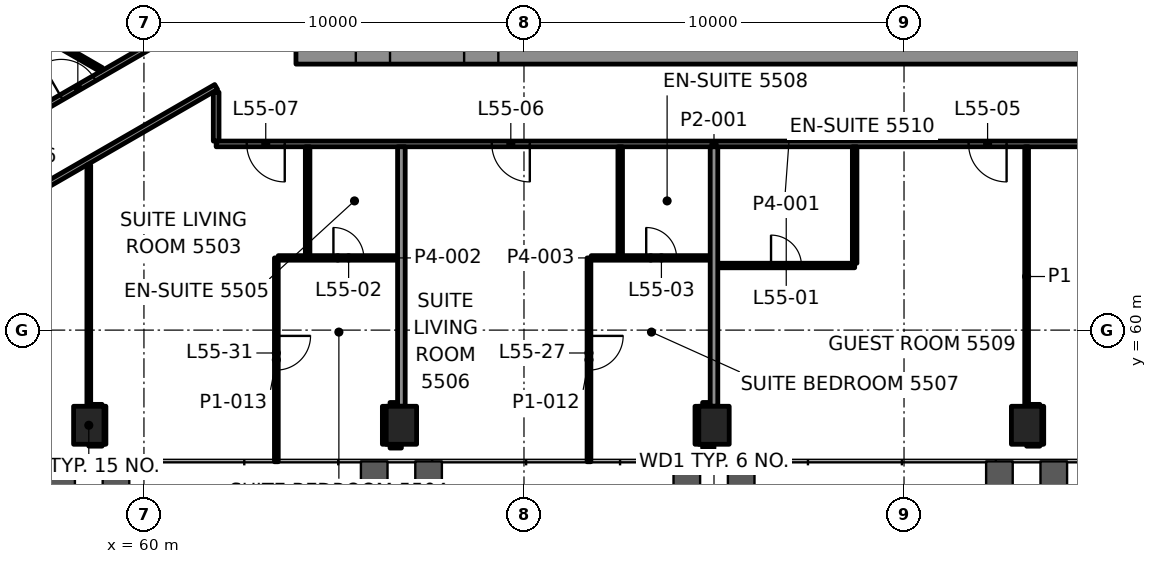
"""IFC4 building model, lengths in metres.
Left out: names, types, materials, properties, quantities, classifications, styles, units other than length and angle.
Written with IfcOpenShell. Run it as: python <this file> out.ifc"""

import sys

from ifc_helpers import new_model, si_unit, direction, frame, frame_2d, origin, origin_2d, place, context, subcontext, project, spatial, rectangle, hollow_rectangle, extrude, element, fill, save


model = new_model("IFC4")
c1 = context("Model", 3, precision=1e-05, world=origin(), true_north=direction((0.0, 1.0)))
c2 = subcontext(c1, "Body", "Model", "MODEL_VIEW")
j1 = project(units=[si_unit("LENGTHUNIT", "METRE"), si_unit("PLANEANGLEUNIT", "RADIAN")], contexts=[c1])
p1 = place(None, origin())
s1 = spatial("IfcSite", under=j1, at=p1, CompositionType="ELEMENT")
p2 = place(p1, origin())
s2 = spatial("IfcBuilding", under=s1, at=p2, CompositionType="ELEMENT")
p3 = place(p2, frame((0.0, 0.0, 233.8)))
s3 = spatial("IfcBuildingStorey", under=s2, at=p3, CompositionType="ELEMENT", Elevation=233.8)
for number, where, z_axis, x_axis in (
    (1, (58.549, 57.496, -0.0), (0.0, 0.0, 1.0), (1.0, 0.0, 0.0)),
    (2, (66.774, 57.496, -0.0), (0.0, 0.0, 1.0), (1.0, 0.0, 0.0)),
    (3, (75.0, 57.496, -0.0), (0.0, 0.0, 1.0), (1.0, 0.0, 0.0)),
    (4, (83.226, 57.496, -0.0), (0.0, 0.0, 1.0), (1.0, 0.0, 0.0)),
):
    element("IfcColumn", number, at=place(p3, frame(where, z_axis=z_axis, x_axis=x_axis)), inside=s3, PredefinedType="COLUMN", context=c2, shape_type="SweptSolid", body=[
        extrude(hollow_rectangle(XDim=0.8, YDim=1.0, WallThickness=0.05, at=origin_2d()), origin(), (0.0, 0.0, 1.0), 3.9),
    ])
p4 = place(p3, frame((64.0, 67.375, 0.0), z_axis=(0.0, 0.0, 1.0), x_axis=(1.0, 0.0, 0.0)))
e5 = element("IfcWall", 5, at=p4, inside=s3, PredefinedType="SHEAR", context=c2, shape_type="SweptSolid", body=[
    extrude(rectangle(XDim=22.0, YDim=0.75, at=frame_2d((11.0, 0.0))), origin(), (0.0, 0.0, 1.0), 3.7),
])
p5 = place(p4, frame((1.575, 0.0, 0.0)))
e6 = element("IfcOpeningElement", 6, at=p5, cuts=e5, PredefinedType="OPENING", context=c2, shape_type="SweptSolid", body=[
    extrude(rectangle(XDim=0.9, YDim=2.1, at=frame_2d((0.45, 1.05))), frame((0.0, 0.385, 0.0), z_axis=(0.0, -1.0, 0.0), x_axis=(1.0, 0.0, 0.0)), (0.0, 0.0, 1.0), 0.77),
])
p6 = place(p4, frame((4.425, 0.0, 0.0)))
e7 = element("IfcOpeningElement", 7, at=p6, cuts=e5, PredefinedType="OPENING", context=c2, shape_type="SweptSolid", body=[
    extrude(rectangle(XDim=0.9, YDim=2.1, at=frame_2d((0.45, 1.05))), frame((0.0, 0.385, 0.0), z_axis=(0.0, -1.0, 0.0), x_axis=(1.0, 0.0, 0.0)), (0.0, 0.0, 1.0), 0.77),
])
p7 = place(p3, frame((58.549, 56.996, 0.0), z_axis=(0.0, 0.0, 1.0), x_axis=(1.0, 0.0, 0.0)))
e8 = element("IfcWall", 8, at=p7, inside=s3, PredefinedType="PARTITIONING", context=c2, shape_type="SweptSolid", body=[
    extrude(rectangle(XDim=0.35, YDim=0.1, at=frame_2d((0.175, 0.0))), origin(), (0.0, 0.0, 1.0), 3.1),
])
for number, where, z_axis, x_axis in (
    (9, (66.475, 56.996, 0.0), (0.0, 0.0, 1.0), (1.0, 0.0, 0.0)),
    (10, (74.7, 56.996, 0.0), (0.0, 0.0, 1.0), (1.0, 0.0, 0.0)),
):
    element("IfcWall", number, at=place(p3, frame(where, z_axis=z_axis, x_axis=x_axis)), inside=s3, PredefinedType="PARTITIONING", context=c2, shape_type="SweptSolid", body=[
        extrude(rectangle(XDim=0.299, YDim=0.2, at=frame_2d((0.149, 0.0))), origin(), (0.0, 0.0, 1.0), 3.1),
    ])
p8 = place(p3, frame((83.226, 56.996, 0.0), z_axis=(0.0, 0.0, 1.0), x_axis=(1.0, 0.0, 0.0)))
e11 = element("IfcWall", 11, at=p8, inside=s3, PredefinedType="PARTITIONING", context=c2, shape_type="SweptSolid", body=[
    extrude(rectangle(XDim=0.349, YDim=0.1, at=frame_2d((0.175, 0.0))), origin(), (0.0, 0.0, 1.0), 3.1),
])
p9 = place(p3, frame((58.609, 57.996, 0.0), z_axis=(0.0, 0.0, 1.0), x_axis=(1.0, 0.0, 0.0)))
e12 = element("IfcWall", 12, at=p9, inside=s3, PredefinedType="PARTITIONING", context=c2, shape_type="SweptSolid", body=[
    extrude(rectangle(XDim=0.29, YDim=0.1, at=frame_2d((0.145, 0.0))), origin(), (0.0, 0.0, 1.0), 3.1),
])
p10 = place(p3, frame((66.475, 57.996, 0.0), z_axis=(0.0, 0.0, 1.0), x_axis=(1.0, 0.0, 0.0)))
e13 = element("IfcWall", 13, at=p10, inside=s3, PredefinedType="PARTITIONING", context=c2, shape_type="SweptSolid", body=[
    extrude(rectangle(XDim=0.199, YDim=0.2, at=frame_2d((0.1, 0.0))), origin(), (0.0, 0.0, 1.0), 3.1),
])
p11 = place(p3, frame((74.7, 57.996, 0.0), z_axis=(0.0, 0.0, 1.0), x_axis=(1.0, 0.0, 0.0)))
e14 = element("IfcWall", 14, at=p11, inside=s3, PredefinedType="PARTITIONING", context=c2, shape_type="SweptSolid", body=[
    extrude(rectangle(XDim=0.199, YDim=0.2, at=frame_2d((0.1, 0.0))), origin(), (0.0, 0.0, 1.0), 3.1),
])
p12 = place(p3, frame((83.286, 57.996, 0.0), z_axis=(0.0, 0.0, 1.0), x_axis=(1.0, 0.0, 0.0)))
e15 = element("IfcWall", 15, at=p12, inside=s3, PredefinedType="PARTITIONING", context=c2, shape_type="SweptSolid", body=[
    extrude(rectangle(XDim=0.289, YDim=0.1, at=frame_2d((0.145, 0.0))), origin(), (0.0, 0.0, 1.0), 3.1),
])
p13 = place(p3, frame((75.1, 61.7, 0.0), z_axis=(0.0, 0.0, 1.0), x_axis=(1.0, 0.0, 0.0)))
e16 = element("IfcWall", 16, at=p13, inside=s3, PredefinedType="PARTITIONING", context=c2, shape_type="SweptSolid", body=[
    extrude(rectangle(XDim=3.601, YDim=0.12, at=frame_2d((1.801, 0.0))), origin(), (0.0, 0.0, 1.0), 3.1),
])
p14 = place(p13, frame((1.401, 0.0, 0.0)))
e17 = element("IfcOpeningElement", 17, at=p14, cuts=e16, PredefinedType="OPENING", context=c2, shape_type="SweptSolid", body=[
    extrude(rectangle(XDim=0.8, YDim=2.1, at=frame_2d((0.4, 1.05))), frame((0.0, 0.07, 0.0), z_axis=(0.0, -1.0, 0.0), x_axis=(1.0, 0.0, 0.0)), (0.0, 0.0, 1.0), 0.14),
])
p15 = place(p3, frame((63.534, 61.9, 0.0), z_axis=(0.0, 0.0, 1.0), x_axis=(1.0, 0.0, 0.0)))
e18 = element("IfcWall", 18, at=p15, inside=s3, PredefinedType="PARTITIONING", context=c2, shape_type="SweptSolid", body=[
    extrude(rectangle(XDim=3.13, YDim=0.12, at=frame_2d((1.565, 0.0))), origin(), (0.0, 0.0, 1.0), 3.1),
])
p16 = place(p15, frame((1.451, 0.0, 0.0)))
e19 = element("IfcOpeningElement", 19, at=p16, cuts=e18, PredefinedType="OPENING", context=c2, shape_type="SweptSolid", body=[
    extrude(rectangle(XDim=0.8, YDim=2.1, at=frame_2d((0.4, 1.05))), frame((0.0, 0.07, 0.0), z_axis=(0.0, -1.0, 0.0), x_axis=(1.0, 0.0, 0.0)), (0.0, 0.0, 1.0), 0.14),
])
p17 = place(p3, frame((71.77, 61.9, 0.0), z_axis=(0.0, 0.0, 1.0), x_axis=(1.0, 0.0, 0.0)))
e20 = element("IfcWall", 20, at=p17, inside=s3, PredefinedType="PARTITIONING", context=c2, shape_type="SweptSolid", body=[
    extrude(rectangle(XDim=3.13, YDim=0.12, at=frame_2d((1.565, 0.0))), origin(), (0.0, 0.0, 1.0), 3.1),
])
p18 = place(p17, frame((1.446, 0.0, 0.0)))
e21 = element("IfcOpeningElement", 21, at=p18, cuts=e20, PredefinedType="OPENING", context=c2, shape_type="SweptSolid", body=[
    extrude(rectangle(XDim=0.8, YDim=2.1, at=frame_2d((0.4, 1.05))), frame((0.0, 0.07, 0.0), z_axis=(0.0, -1.0, 0.0), x_axis=(1.0, 0.0, 0.0)), (0.0, 0.0, 1.0), 0.14),
])
p19 = place(p3, frame((88.099, 64.9, 0.0), z_axis=(0.0, 0.0, 1.0), x_axis=(-1.0, 0.0, 0.0)))
e22 = element("IfcWall", 22, at=p19, inside=s3, PredefinedType="PARTITIONING", context=c2, shape_type="SweptSolid", body=[
    extrude(rectangle(XDim=26.199, YDim=0.15, at=frame_2d((13.1, 0.0))), origin(), (0.0, 0.0, 1.0), 3.1),
])
p20 = place(p19, frame((2.088, 0.0, 0.0)))
e23 = element("IfcOpeningElement", 23, at=p20, cuts=e22, PredefinedType="OPENING", context=c2, shape_type="SweptSolid", body=[
    extrude(rectangle(XDim=0.9, YDim=2.1, at=frame_2d((0.45, 1.05))), frame((0.0, 0.085, 0.0), z_axis=(0.0, -1.0, 0.0), x_axis=(1.0, 0.0, 0.0)), (0.0, 0.0, 1.0), 0.17),
])
p21 = place(p19, frame((5.4, 0.0, 0.0)))
e24 = element("IfcOpeningElement", 24, at=p21, cuts=e22, PredefinedType="OPENING", context=c2, shape_type="SweptSolid", body=[
    extrude(rectangle(XDim=1.0, YDim=2.1, at=frame_2d((0.5, 1.05))), frame((0.0, 0.085, 0.0), z_axis=(0.0, -1.0, 0.0), x_axis=(1.0, 0.0, 0.0)), (0.0, 0.0, 1.0), 0.17),
])
p22 = place(p19, frame((17.946, 0.0, 0.0)))
e25 = element("IfcOpeningElement", 25, at=p22, cuts=e22, PredefinedType="OPENING", context=c2, shape_type="SweptSolid", body=[
    extrude(rectangle(XDim=1.0, YDim=2.1, at=frame_2d((0.5, 1.05))), frame((0.0, 0.085, 0.0), z_axis=(0.0, -1.0, 0.0), x_axis=(1.0, 0.0, 0.0)), (0.0, 0.0, 1.0), 0.17),
])
p23 = place(p19, frame((24.395, 0.0, 0.0)))
e26 = element("IfcOpeningElement", 26, at=p23, cuts=e22, PredefinedType="OPENING", context=c2, shape_type="SweptSolid", body=[
    extrude(rectangle(XDim=1.0, YDim=2.1, at=frame_2d((0.5, 1.05))), frame((0.0, 0.085, 0.0), z_axis=(0.0, -1.0, 0.0), x_axis=(1.0, 0.0, 0.0)), (0.0, 0.0, 1.0), 0.17),
])
p24 = place(p3, frame((61.9, 66.397, 0.0), z_axis=(0.0, 0.0, 1.0), x_axis=(-0.866028172479, -0.49999520445, 0.0)))
e27 = element("IfcWall", 27, at=p24, inside=s3, PredefinedType="PARTITIONING", context=c2, shape_type="SweptSolid", body=[
    extrude(rectangle(XDim=11.726, YDim=0.15, at=frame_2d((5.863, 0.0))), origin(), (0.0, 0.0, 1.0), 2.947),
])
p25 = place(p24, frame((7.246, 0.0, 0.0)))
e28 = element("IfcOpeningElement", 28, at=p25, cuts=e27, PredefinedType="OPENING", context=c2, shape_type="SweptSolid", body=[
    extrude(rectangle(XDim=0.9, YDim=2.1, at=frame_2d((0.45, 1.05))), frame((0.0, 0.085, 0.0), z_axis=(0.0, -1.0, 0.0), x_axis=(1.0, 0.0, 0.0)), (0.0, 0.0, 1.0), 0.17),
])
p26 = place(p3, frame((50.844, 62.093, 0.0), z_axis=(0.0, 0.0, 1.0), x_axis=(0.866032955338, 0.499986920098, 0.0)))
e29 = element("IfcWall", 29, at=p26, inside=s3, PredefinedType="PARTITIONING", context=c2, shape_type="SweptSolid", body=[
    extrude(rectangle(XDim=12.679, YDim=0.15, at=frame_2d((6.339, 0.0))), origin(), (0.0, 0.0, 1.0), 3.1),
])
p27 = place(p26, frame((0.175, 0.0, 0.0)))
e30 = element("IfcOpeningElement", 30, at=p27, cuts=e29, PredefinedType="OPENING", context=c2, shape_type="SweptSolid", body=[
    extrude(rectangle(XDim=1.0, YDim=2.1, at=frame_2d((0.5, 1.05))), frame((0.0, 0.085, 0.0), z_axis=(0.0, -1.0, 0.0), x_axis=(1.0, 0.0, 0.0)), (0.0, 0.0, 1.0), 0.17),
])
p28 = place(p26, frame((8.063, 0.0, 0.0)))
e31 = element("IfcOpeningElement", 31, at=p28, cuts=e29, PredefinedType="OPENING", context=c2, shape_type="SweptSolid", body=[
    extrude(rectangle(XDim=1.0, YDim=2.1, at=frame_2d((0.5, 1.05))), frame((0.0, 0.085, 0.0), z_axis=(0.0, -1.0, 0.0), x_axis=(1.0, 0.0, 0.0)), (0.0, 0.0, 1.0), 0.17),
])
p29 = place(p3, frame((83.626, 56.997, 0.0), z_axis=(0.0, 0.0, 1.0), x_axis=(0.0, 1.0, 0.0)))
e32 = element("IfcWall", 32, at=p29, inside=s3, PredefinedType="PARTITIONING", context=c2, shape_type="SweptSolid", body=[
    extrude(rectangle(XDim=0.999, YDim=0.1, at=frame_2d((0.5, 0.0))), origin(), (0.0, 0.0, 1.0), 3.022),
])
p30 = place(p3, frame((83.226, 57.996, 0.0), z_axis=(0.0, 0.0, 1.0), x_axis=(0.0, 1.0, 0.0)))
e33 = element("IfcWall", 33, at=p30, inside=s3, PredefinedType="PARTITIONING", context=c2, shape_type="SweptSolid", body=[
    extrude(rectangle(XDim=6.829, YDim=0.1, at=frame_2d((3.415, 0.0))), origin(), (0.0, 0.0, 1.0), 3.1),
])
p31 = place(p3, frame((78.701, 61.76, 0.0), z_axis=(0.0, 0.0, 1.0), x_axis=(0.0, 1.0, 0.0)))
e34 = element("IfcWall", 34, at=p31, inside=s3, PredefinedType="PARTITIONING", context=c2, shape_type="SweptSolid", body=[
    extrude(rectangle(XDim=3.065, YDim=0.12, at=frame_2d((1.532, 0.0))), origin(), (0.0, 0.0, 1.0), 3.1),
])
p32 = place(p3, frame((75.0, 57.997, 0.0), z_axis=(0.0, 0.0, 1.0), x_axis=(0.0, 1.0, 0.0)))
e35 = element("IfcWall", 35, at=p32, inside=s3, PredefinedType="PARTITIONING", context=c2, shape_type="SweptSolid", body=[
    extrude(rectangle(XDim=6.828, YDim=0.2, at=frame_2d((3.414, 0.0))), origin(), (0.0, 0.0, 1.0), 3.1),
])
p33 = place(p3, frame((74.6, 56.997, 0.0), z_axis=(0.0, 0.0, 1.0), x_axis=(0.0, 1.0, 0.0)))
e36 = element("IfcWall", 36, at=p33, inside=s3, PredefinedType="PARTITIONING", context=c2, shape_type="SweptSolid", body=[
    extrude(rectangle(XDim=0.999, YDim=0.2, at=frame_2d((0.5, 0.0))), origin(), (0.0, 0.0, 1.0), 3.022),
])
p34 = place(p3, frame((72.532, 61.96, 0.0), z_axis=(0.0, 0.0, 1.0), x_axis=(0.0, 1.0, 0.0)))
e37 = element("IfcWall", 37, at=p34, inside=s3, PredefinedType="PARTITIONING", context=c2, shape_type="SweptSolid", body=[
    extrude(rectangle(XDim=2.865, YDim=0.12, at=frame_2d((1.433, 0.0))), origin(), (0.0, 0.0, 1.0), 3.1),
])
p35 = place(p3, frame((71.71, 61.9, 0.0), z_axis=(0.0, 0.0, 1.0), x_axis=(0.0, -1.0, 0.0)))
e38 = element("IfcWall", 38, at=p35, inside=s3, PredefinedType="PARTITIONING", context=c2, shape_type="SweptSolid", body=[
    extrude(rectangle(XDim=5.364, YDim=0.1, at=frame_2d((2.682, 0.0))), origin(), (0.0, 0.0, 1.0), 3.022),
])
p36 = place(p35, frame((2.052, 0.0, 0.0)))
e39 = element("IfcOpeningElement", 39, at=p36, cuts=e38, PredefinedType="OPENING", context=c2, shape_type="SweptSolid", body=[
    extrude(rectangle(XDim=0.9, YDim=2.1, at=frame_2d((0.45, 1.05))), frame((0.0, 0.06, 0.0), z_axis=(0.0, -1.0, 0.0), x_axis=(1.0, 0.0, 0.0)), (0.0, 0.0, 1.0), 0.12),
])
p37 = place(p3, frame((66.774, 57.997, 0.0), z_axis=(0.0, 0.0, 1.0), x_axis=(0.0, 1.0, 0.0)))
e40 = element("IfcWall", 40, at=p37, inside=s3, PredefinedType="PARTITIONING", context=c2, shape_type="SweptSolid", body=[
    extrude(rectangle(XDim=6.828, YDim=0.2, at=frame_2d((3.414, 0.0))), origin(), (0.0, 0.0, 1.0), 3.1),
])
p38 = place(p3, frame((66.374, 56.997, 0.0), z_axis=(0.0, 0.0, 1.0), x_axis=(0.0, 1.0, 0.0)))
e41 = element("IfcWall", 41, at=p38, inside=s3, PredefinedType="PARTITIONING", context=c2, shape_type="SweptSolid", body=[
    extrude(rectangle(XDim=0.999, YDim=0.2, at=frame_2d((0.5, 0.0))), origin(), (0.0, 0.0, 1.0), 3.022),
])
p39 = place(p3, frame((64.307, 61.96, 0.0), z_axis=(0.0, 0.0, 1.0), x_axis=(0.0, 1.0, 0.0)))
e42 = element("IfcWall", 42, at=p39, inside=s3, PredefinedType="PARTITIONING", context=c2, shape_type="SweptSolid", body=[
    extrude(rectangle(XDim=2.865, YDim=0.12, at=frame_2d((1.433, 0.0))), origin(), (0.0, 0.0, 1.0), 3.1),
])
p40 = place(p3, frame((63.484, 61.9, 0.0), z_axis=(0.0, 0.0, 1.0), x_axis=(0.0, -1.0, 0.0)))
e43 = element("IfcWall", 43, at=p40, inside=s3, PredefinedType="PARTITIONING", context=c2, shape_type="SweptSolid", body=[
    extrude(rectangle(XDim=5.364, YDim=0.1, at=frame_2d((2.682, 0.0))), origin(), (0.0, 0.0, 1.0), 3.022),
])
p41 = place(p40, frame((2.052, 0.0, 0.0)))
e44 = element("IfcOpeningElement", 44, at=p41, cuts=e43, PredefinedType="OPENING", context=c2, shape_type="SweptSolid", body=[
    extrude(rectangle(XDim=0.9, YDim=2.1, at=frame_2d((0.45, 1.05))), frame((0.0, 0.06, 0.0), z_axis=(0.0, -1.0, 0.0), x_axis=(1.0, 0.0, 0.0)), (0.0, 0.0, 1.0), 0.12),
])
p42 = place(p3, frame((61.9, 64.975, 0.0), z_axis=(0.0, 0.0, 1.0), x_axis=(0.0, 1.0, 0.0)))
e45 = element("IfcWall", 45, at=p42, inside=s3, PredefinedType="PARTITIONING", context=c2, shape_type="SweptSolid", body=[
    extrude(rectangle(XDim=1.286, YDim=0.15, at=frame_2d((0.643, 0.0))), origin(), (0.0, 0.0, 1.0), 2.947),
])
p43 = place(p3, frame((58.949, 56.996, 0.0), z_axis=(0.0, 0.0, 1.0), x_axis=(0.0, 1.0, 0.0)))
e46 = element("IfcWall", 46, at=p43, inside=s3, PredefinedType="PARTITIONING", context=c2, shape_type="SweptSolid", body=[
    extrude(rectangle(XDim=1.0, YDim=0.1, at=frame_2d((0.5, 0.0))), origin(), (0.0, 0.0, 1.0), 3.022),
])
p44 = place(p3, frame((58.549, 57.996, 0.0), z_axis=(0.0, 0.0, 1.0), x_axis=(0.0, 1.0, 0.0)))
e47 = element("IfcWall", 47, at=p44, inside=s3, PredefinedType="PARTITIONING", context=c2, shape_type="SweptSolid", body=[
    extrude(rectangle(XDim=6.35, YDim=0.1, at=frame_2d((3.175, 0.0))), origin(), (0.0, 0.0, 1.0), 2.947),
])
p45 = place(p3, frame((58.876, 66.856, 0.0), z_axis=(0.0, 0.0, 1.0), x_axis=(-0.866028357664, 0.499994883695, 0.0)))
e48 = element("IfcWall", 48, at=p45, inside=s3, PredefinedType="PARTITIONING", context=c2, shape_type="SweptSolid", body=[
    extrude(rectangle(XDim=3.568, YDim=0.12, at=frame_2d((1.784, 0.0))), origin(), (0.0, 0.0, 1.0), 3.1),
])
p46 = place(p14, origin())
e49 = element("IfcDoor", 49, at=p46, inside=s3, OperationType="SINGLE_SWING_LEFT", PredefinedType="DOOR", context=c2, shape_type="SweptSolid", body=[
    extrude(rectangle(XDim=0.8, YDim=2.1, at=frame_2d((0.4, 1.05))), frame((0.0, 0.025, 0.0), z_axis=(0.0, -1.0, 0.0), x_axis=(1.0, 0.0, 0.0)), (0.0, 0.0, 1.0), 0.05),
])
fill(e17, e49)
p47 = place(p16, origin())
e50 = element("IfcDoor", 50, at=p47, inside=s3, OperationType="SINGLE_SWING_RIGHT", PredefinedType="DOOR", context=c2, shape_type="SweptSolid", body=[
    extrude(rectangle(XDim=0.8, YDim=2.1, at=frame_2d((0.4, 1.05))), frame((0.0, 0.025, 0.0), z_axis=(0.0, -1.0, 0.0), x_axis=(1.0, 0.0, 0.0)), (0.0, 0.0, 1.0), 0.05),
])
fill(e19, e50)
p48 = place(p18, origin())
e51 = element("IfcDoor", 51, at=p48, inside=s3, OperationType="SINGLE_SWING_LEFT", PredefinedType="DOOR", context=c2, shape_type="SweptSolid", body=[
    extrude(rectangle(XDim=0.8, YDim=2.1, at=frame_2d((0.4, 1.05))), frame((0.0, 0.025, 0.0), z_axis=(0.0, -1.0, 0.0), x_axis=(1.0, 0.0, 0.0)), (0.0, 0.0, 1.0), 0.05),
])
fill(e21, e51)
p49 = place(p21, origin())
e52 = element("IfcDoor", 52, at=p49, inside=s3, OperationType="SINGLE_SWING_LEFT", PredefinedType="DOOR", context=c2, shape_type="SweptSolid", body=[
    extrude(rectangle(XDim=1.0, YDim=2.1, at=frame_2d((0.5, 1.05))), frame((0.0, 0.025, 0.0), z_axis=(0.0, -1.0, 0.0), x_axis=(1.0, 0.0, 0.0)), (0.0, 0.0, 1.0), 0.05),
])
fill(e24, e52)
p50 = place(p22, origin())
e53 = element("IfcDoor", 53, at=p50, inside=s3, OperationType="SINGLE_SWING_RIGHT", PredefinedType="DOOR", context=c2, shape_type="SweptSolid", body=[
    extrude(rectangle(XDim=1.0, YDim=2.1, at=frame_2d((0.5, 1.05))), frame((0.0, 0.025, 0.0), z_axis=(0.0, -1.0, 0.0), x_axis=(1.0, 0.0, 0.0)), (0.0, 0.0, 1.0), 0.05),
])
fill(e25, e53)
p51 = place(p23, origin())
e54 = element("IfcDoor", 54, at=p51, inside=s3, OperationType="SINGLE_SWING_LEFT", PredefinedType="DOOR", context=c2, shape_type="SweptSolid", body=[
    extrude(rectangle(XDim=1.0, YDim=2.1, at=frame_2d((0.5, 1.05))), frame((0.0, 0.025, 0.0), z_axis=(0.0, -1.0, 0.0), x_axis=(1.0, 0.0, 0.0)), (0.0, 0.0, 1.0), 0.05),
])
fill(e26, e54)
p52 = place(p28, origin())
e55 = element("IfcDoor", 55, at=p52, inside=s3, OperationType="SINGLE_SWING_LEFT", PredefinedType="DOOR", context=c2, shape_type="SweptSolid", body=[
    extrude(rectangle(XDim=1.0, YDim=2.1, at=frame_2d((0.5, 1.05))), frame((0.0, 0.025, 0.0), z_axis=(0.0, -1.0, 0.0), x_axis=(1.0, 0.0, 0.0)), (0.0, 0.0, 1.0), 0.05),
])
fill(e31, e55)
p53 = place(p36, origin())
e56 = element("IfcDoor", 56, at=p53, inside=s3, OperationType="SINGLE_SWING_LEFT", PredefinedType="DOOR", context=c2, shape_type="SweptSolid", body=[
    extrude(rectangle(XDim=0.9, YDim=2.1, at=frame_2d((0.45, 1.05))), frame((0.0, 0.025, 0.0), z_axis=(0.0, -1.0, 0.0), x_axis=(1.0, 0.0, 0.0)), (0.0, 0.0, 1.0), 0.05),
])
fill(e39, e56)
p54 = place(p41, origin())
e57 = element("IfcDoor", 57, at=p54, inside=s3, OperationType="SINGLE_SWING_RIGHT", PredefinedType="DOOR", context=c2, shape_type="SweptSolid", body=[
    extrude(rectangle(XDim=0.9, YDim=2.1, at=frame_2d((0.45, 1.05))), frame((0.0, 0.025, 0.0), z_axis=(0.0, -1.0, 0.0), x_axis=(1.0, 0.0, 0.0)), (0.0, 0.0, 1.0), 0.05),
])
fill(e44, e57)
p55 = place(p5, origin())
e58 = element("IfcDoor", 58, at=p55, inside=s3, OperationType="SINGLE_SWING_LEFT", PredefinedType="DOOR", context=c2, shape_type="SweptSolid", body=[
    extrude(rectangle(XDim=0.9, YDim=2.1, at=frame_2d((0.45, 1.05))), frame((0.0, 0.095, 0.0), z_axis=(0.0, -1.0, 0.0), x_axis=(1.0, 0.0, 0.0)), (0.0, 0.0, 1.0), 0.19),
])
fill(e6, e58)
p56 = place(p6, origin())
e59 = element("IfcDoor", 59, at=p56, inside=s3, OperationType="SINGLE_SWING_LEFT", PredefinedType="DOOR", context=c2, shape_type="SweptSolid", body=[
    extrude(rectangle(XDim=0.9, YDim=2.1, at=frame_2d((0.45, 1.05))), frame((0.0, 0.095, 0.0), z_axis=(0.0, -1.0, 0.0), x_axis=(1.0, 0.0, 0.0)), (0.0, 0.0, 1.0), 0.19),
])
fill(e7, e59)
save(model, sys.argv[1])
